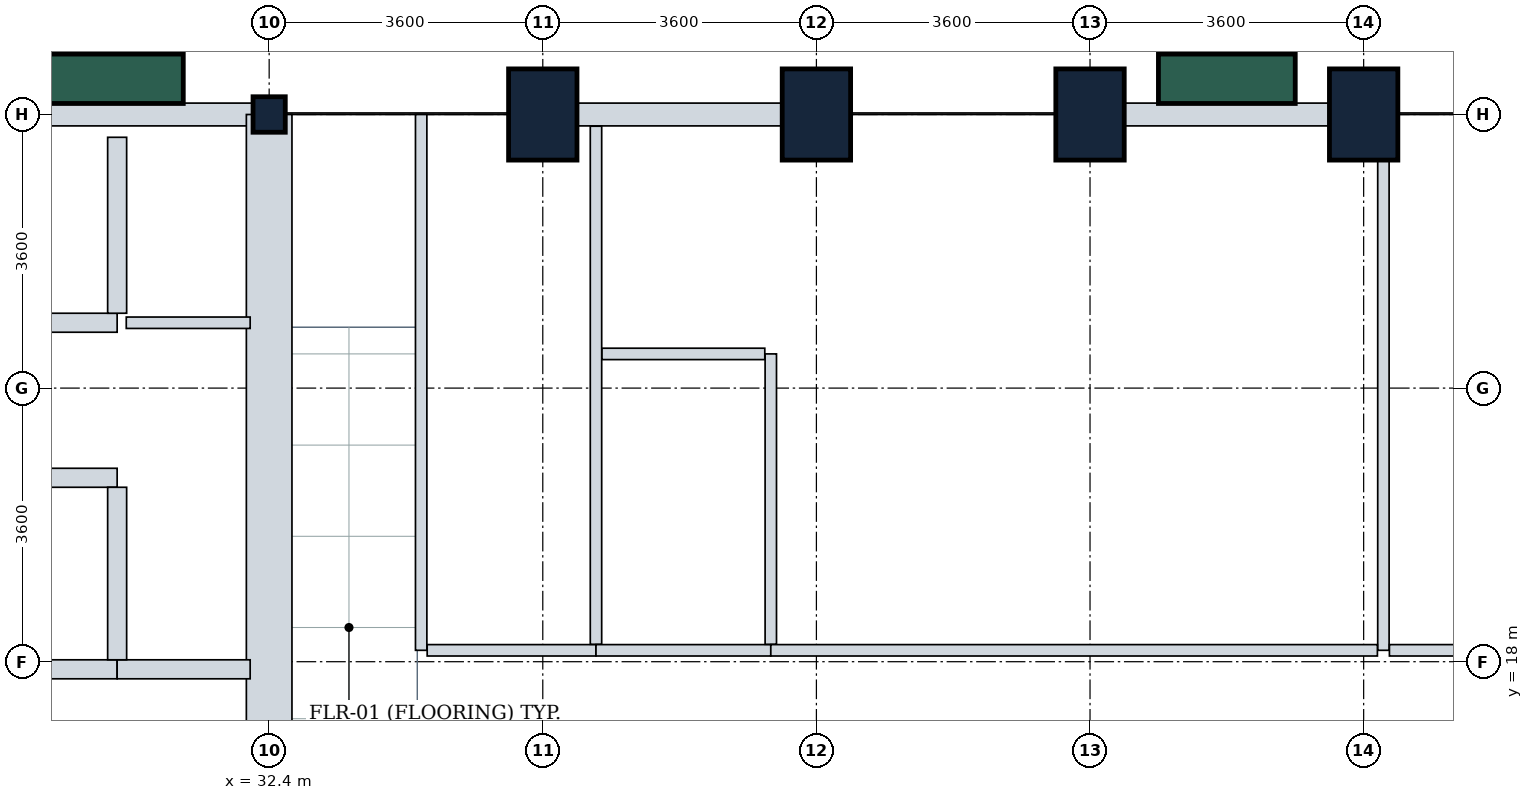
"""IFC4 building model, lengths in metres.
Left out: names, types, materials, properties, quantities, classifications, styles, units other than length and angle.
Written with IfcOpenShell. Run it as: python <this file> out.ifc"""

import sys

from ifc_helpers import new_model, si_unit, direction, frame, frame_2d, origin, origin_2d, place, context, subcontext, project, spatial, rectangle, i_section, extrude, element, fill, save


model = new_model("IFC4")
c1 = context("Model", 3, precision=1e-05, world=origin(), true_north=direction((0.0, 1.0)))
c2 = subcontext(c1, "Body", "Model", "MODEL_VIEW")
j1 = project(units=[si_unit("LENGTHUNIT", "METRE"), si_unit("PLANEANGLEUNIT", "RADIAN")], contexts=[c1])
p1 = place(None, origin())
s1 = spatial("IfcSite", under=j1, at=p1, CompositionType="ELEMENT")
p2 = place(p1, origin())
s2 = spatial("IfcBuilding", under=s1, at=p2, CompositionType="ELEMENT")
p3 = place(p2, frame((0.0, 0.0, 24.0)))
s3 = spatial("IfcBuildingStorey", under=s2, at=p3, CompositionType="ELEMENT", Elevation=24.0)
p4 = place(p3, frame((32.4, 25.2, 0.0), z_axis=(0.0, 0.0, 1.0), x_axis=(1.0, 0.0, 0.0)))
e1 = element("IfcColumn", 1, at=p4, inside=s3, PredefinedType="COLUMN", context=c2, shape_type="SweptSolid", body=[
    extrude(i_section(OverallWidth=0.424, OverallDepth=0.467, WebThickness=0.033, FlangeThickness=0.053, FilletRadius=0.015, at=origin_2d()), origin(), (0.0, 0.0, 1.0), 3.9),
])
for number, where, z_axis, x_axis in (
    (2, (36.0, 25.2, 0.0), (0.0, 0.0, 1.0), (1.0, 0.0, 0.0)),
    (3, (39.6, 25.2, 0.0), (0.0, 0.0, 1.0), (1.0, 0.0, 0.0)),
    (4, (43.2, 25.2, 0.0), (0.0, 0.0, 1.0), (1.0, 0.0, 0.0)),
    (5, (46.8, 25.2, 0.0), (0.0, 0.0, 1.0), (1.0, 0.0, 0.0)),
):
    element("IfcColumn", number, at=place(p3, frame(where, z_axis=z_axis, x_axis=x_axis)), inside=s3, PredefinedType="COLUMN", context=c2, shape_type="SweptSolid", body=[
        extrude(rectangle(XDim=0.9, YDim=1.2, at=origin_2d()), origin(), (0.0, 0.0, 1.0), 3.9),
    ])
p5 = place(p3, frame((43.2, 25.2, 0.0), z_axis=(0.0, 0.0, 1.0), x_axis=(1.0, 0.0, 0.0)))
e6 = element("IfcWall", 6, at=p5, inside=s3, PredefinedType="STANDARD", context=c2, shape_type="SweptSolid", body=[
    extrude(rectangle(XDim=3.6, YDim=0.3, at=frame_2d((1.8, 0.0))), origin(), (0.0, 0.0, 1.0), 2.93),
])
p6 = place(p5, frame((0.9, 0.0, 0.85)))
e7 = element("IfcOpeningElement", 7, at=p6, cuts=e6, PredefinedType="OPENING", context=c2, shape_type="SweptSolid", body=[
    extrude(rectangle(XDim=1.8, YDim=1.35, at=frame_2d((0.9, 0.675))), frame((0.0, 0.16, 0.0), z_axis=(0.0, -1.0, 0.0), x_axis=(1.0, 0.0, 0.0)), (0.0, 0.0, 1.0), 0.32),
])
p7 = place(p3, frame((36.0, 25.2, 0.0), z_axis=(0.0, 0.0, 1.0), x_axis=(1.0, 0.0, 0.0)))
e8 = element("IfcWall", 8, at=p7, inside=s3, PredefinedType="STANDARD", context=c2, shape_type="SweptSolid", body=[
    extrude(rectangle(XDim=3.6, YDim=0.3, at=frame_2d((1.8, 0.0))), origin(), (0.0, 0.0, 1.0), 2.93),
])
p8 = place(p3, frame((28.8, 25.2, 0.0), z_axis=(0.0, 0.0, 1.0), x_axis=(1.0, 0.0, 0.0)))
e9 = element("IfcWall", 9, at=p8, inside=s3, PredefinedType="STANDARD", context=c2, shape_type="SweptSolid", body=[
    extrude(rectangle(XDim=3.6, YDim=0.3, at=frame_2d((1.8, 0.0))), origin(), (0.0, 0.0, 1.0), 3.635),
])
p9 = place(p8, frame((0.67, 0.0, 0.85)))
e10 = element("IfcOpeningElement", 10, at=p9, cuts=e9, PredefinedType="OPENING", context=c2, shape_type="SweptSolid", body=[
    extrude(rectangle(XDim=1.8, YDim=1.35, at=frame_2d((0.9, 0.675))), frame((0.0, 0.16, 0.0), z_axis=(0.0, -1.0, 0.0), x_axis=(1.0, 0.0, 0.0)), (0.0, 0.0, 1.0), 0.32),
])
p10 = place(p3, frame((32.4, 10.8, 0.0), z_axis=(0.0, 0.0, 1.0), x_axis=(0.0, 1.0, 0.0)))
e11 = element("IfcWall", 11, at=p10, inside=s3, PredefinedType="SHEAR", context=c2, shape_type="SweptSolid", body=[
    extrude(rectangle(XDim=14.4, YDim=0.6, at=frame_2d((7.2, 0.0))), origin(), (0.0, 0.0, 1.0), 3.65),
])
p11 = place(p10, frame((4.35, 0.0, 0.0)))
e12 = element("IfcOpeningElement", 12, at=p11, cuts=e11, PredefinedType="OPENING", context=c2, shape_type="SweptSolid", body=[
    extrude(rectangle(XDim=1.2, YDim=2.1, at=frame_2d((0.6, 1.05))), frame((0.0, 0.31, 0.0), z_axis=(0.0, -1.0, 0.0), x_axis=(1.0, 0.0, 0.0)), (0.0, 0.0, 1.0), 0.62),
])
p12 = place(p10, frame((10.0, 0.0, 0.0)))
e13 = element("IfcOpeningElement", 13, at=p12, cuts=e11, PredefinedType="OPENING", context=c2, shape_type="SweptSolid", body=[
    extrude(rectangle(XDim=1.2, YDim=2.1, at=frame_2d((0.6, 1.05))), frame((0.0, 0.31, 0.0), z_axis=(0.0, -1.0, 0.0), x_axis=(1.0, 0.0, 0.0)), (0.0, 0.0, 1.0), 0.62),
])
p13 = place(p3, frame((21.88, 17.9, 0.0), z_axis=(0.0, 0.0, 1.0), x_axis=(1.0, 0.0, 0.0)))
e14 = element("IfcWall", 14, at=p13, inside=s3, PredefinedType="PARTITIONING", context=c2, shape_type="SweptSolid", body=[
    extrude(rectangle(XDim=8.52, YDim=0.25, at=frame_2d((4.26, 0.0))), origin(), (0.0, 0.0, 1.0), 3.635),
])
p14 = place(p3, frame((30.4, 17.9, 0.0), z_axis=(0.0, 0.0, 1.0), x_axis=(1.0, 0.0, 0.0)))
e15 = element("IfcWall", 15, at=p14, inside=s3, PredefinedType="PARTITIONING", context=c2, shape_type="SweptSolid", body=[
    extrude(rectangle(XDim=1.75, YDim=0.25, at=frame_2d((0.875, 0.0))), origin(), (0.0, 0.0, 1.0), 3.635),
])
p15 = place(p14, frame((0.32, 0.0, 0.0)))
e16 = element("IfcOpeningElement", 16, at=p15, cuts=e15, PredefinedType="OPENING", context=c2, shape_type="SweptSolid", body=[
    extrude(rectangle(XDim=1.1, YDim=2.1, at=frame_2d((0.55, 1.05))), frame((0.0, 0.135, 0.0), z_axis=(0.0, -1.0, 0.0), x_axis=(1.0, 0.0, 0.0)), (0.0, 0.0, 1.0), 0.27),
])
p16 = place(p3, frame((23.18, 20.42, 0.0), z_axis=(0.0, 0.0, 1.0), x_axis=(1.0, 0.0, 0.0)))
e17 = element("IfcWall", 17, at=p16, inside=s3, PredefinedType="PARTITIONING", context=c2, shape_type="SweptSolid", body=[
    extrude(rectangle(XDim=7.22, YDim=0.25, at=frame_2d((3.61, 0.0))), origin(), (0.0, 0.0, 1.0), 3.635),
])
p17 = place(p3, frame((30.4, 18.025, 0.0), z_axis=(0.0, 0.0, 1.0), x_axis=(0.0, 1.0, 0.0)))
e18 = element("IfcWall", 18, at=p17, inside=s3, PredefinedType="PARTITIONING", context=c2, shape_type="SweptSolid", body=[
    extrude(rectangle(XDim=2.27, YDim=0.25, at=frame_2d((1.135, 0.0))), origin(), (0.0, 0.0, 1.0), 3.635),
])
p18 = place(p3, frame((23.18, 22.46, 0.0), z_axis=(0.0, 0.0, 1.0), x_axis=(1.0, 0.0, 0.0)))
e19 = element("IfcWall", 19, at=p18, inside=s3, PredefinedType="PARTITIONING", context=c2, shape_type="SweptSolid", body=[
    extrude(rectangle(XDim=7.22, YDim=0.25, at=frame_2d((3.61, 0.0))), origin(), (0.0, 0.0, 1.0), 3.635),
])
p19 = place(p3, frame((30.4, 22.585, 0.0), z_axis=(0.0, 0.0, 1.0), x_axis=(0.0, 1.0, 0.0)))
e20 = element("IfcWall", 20, at=p19, inside=s3, PredefinedType="PARTITIONING", context=c2, shape_type="SweptSolid", body=[
    extrude(rectangle(XDim=2.315, YDim=0.25, at=frame_2d((1.157, 0.0))), origin(), (0.0, 0.0, 1.0), 3.635),
])
p20 = place(p3, frame((30.52, 22.46, 0.0), z_axis=(0.0, 0.0, 1.0), x_axis=(1.0, 0.0, 0.0)))
e21 = element("IfcWall", 21, at=p20, inside=s3, PredefinedType="PARTITIONING", context=c2, shape_type="SweptSolid", body=[
    extrude(rectangle(XDim=1.63, YDim=0.15, at=frame_2d((0.815, 0.0))), origin(), (0.0, 0.0, 1.0), 3.635),
])
p21 = place(p20, frame((0.38, 0.0, 0.0)))
e22 = element("IfcOpeningElement", 22, at=p21, cuts=e21, PredefinedType="OPENING", context=c2, shape_type="SweptSolid", body=[
    extrude(rectangle(XDim=0.85, YDim=2.1, at=frame_2d((0.425, 1.05))), frame((0.0, 0.085, 0.0), z_axis=(0.0, -1.0, 0.0), x_axis=(1.0, 0.0, 0.0)), (0.0, 0.0, 1.0), 0.17),
])
p22 = place(p3, frame((34.4, 18.15, 0.0), z_axis=(0.0, 0.0, 1.0), x_axis=(0.0, 1.0, 0.0)))
e23 = element("IfcWall", 23, at=p22, inside=s3, PredefinedType="PARTITIONING", context=c2, shape_type="SweptSolid", body=[
    extrude(rectangle(XDim=7.05, YDim=0.15, at=frame_2d((3.525, 0.0))), origin(), (0.0, 0.0, 1.0), 2.93),
])
p23 = place(p3, frame((34.479, 18.15, 0.0), z_axis=(0.0, 0.0, 1.0), x_axis=(1.0, 0.0, 0.0)))
e24 = element("IfcWall", 24, at=p23, inside=s3, PredefinedType="PARTITIONING", context=c2, shape_type="SweptSolid", body=[
    extrude(rectangle(XDim=2.221, YDim=0.15, at=frame_2d((1.11, 0.0))), origin(), (0.0, 0.0, 1.0), 3.08),
])
p24 = place(p23, frame((0.618, 0.0, 0.0)))
e25 = element("IfcOpeningElement", 25, at=p24, cuts=e24, PredefinedType="OPENING", context=c2, shape_type="SweptSolid", body=[
    extrude(rectangle(XDim=0.85, YDim=2.1, at=frame_2d((0.425, 1.05))), frame((0.0, 0.085, 0.0), z_axis=(0.0, -1.0, 0.0), x_axis=(1.0, 0.0, 0.0)), (0.0, 0.0, 1.0), 0.17),
])
p25 = place(p3, frame((36.7, 18.229, 0.0), z_axis=(0.0, 0.0, 1.0), x_axis=(0.0, 1.0, 0.0)))
e26 = element("IfcWall", 26, at=p25, inside=s3, PredefinedType="PARTITIONING", context=c2, shape_type="SweptSolid", body=[
    extrude(rectangle(XDim=6.817, YDim=0.15, at=frame_2d((3.408, 0.0))), origin(), (0.0, 0.0, 1.0), 2.93),
])
p26 = place(p3, frame((36.7, 18.15, 0.0), z_axis=(0.0, 0.0, 1.0), x_axis=(1.0, 0.0, 0.0)))
e27 = element("IfcWall", 27, at=p26, inside=s3, PredefinedType="PARTITIONING", context=c2, shape_type="SweptSolid", body=[
    extrude(rectangle(XDim=2.3, YDim=0.15, at=frame_2d((1.15, 0.0))), origin(), (0.0, 0.0, 1.0), 3.08),
])
p27 = place(p26, frame((0.697, 0.0, 0.0)))
e28 = element("IfcOpeningElement", 28, at=p27, cuts=e27, PredefinedType="OPENING", context=c2, shape_type="SweptSolid", body=[
    extrude(rectangle(XDim=0.85, YDim=2.1, at=frame_2d((0.425, 1.05))), frame((0.0, 0.085, 0.0), z_axis=(0.0, -1.0, 0.0), x_axis=(1.0, 0.0, 0.0)), (0.0, 0.0, 1.0), 0.17),
])
p28 = place(p3, frame((39.0, 18.229, 0.0), z_axis=(0.0, 0.0, 1.0), x_axis=(0.0, 1.0, 0.0)))
e29 = element("IfcWall", 29, at=p28, inside=s3, PredefinedType="PARTITIONING", context=c2, shape_type="SweptSolid", body=[
    extrude(rectangle(XDim=3.821, YDim=0.15, at=frame_2d((1.911, 0.0))), origin(), (0.0, 0.0, 1.0), 3.03),
])
p29 = place(p3, frame((36.779, 22.05, 0.0), z_axis=(0.0, 0.0, 1.0), x_axis=(1.0, 0.0, 0.0)))
e30 = element("IfcWall", 30, at=p29, inside=s3, PredefinedType="PARTITIONING", context=c2, shape_type="SweptSolid", body=[
    extrude(rectangle(XDim=2.142, YDim=0.15, at=frame_2d((1.071, 0.0))), origin(), (0.0, 0.0, 1.0), 3.635),
])
p30 = place(p3, frame((47.06, 18.15, 0.0), z_axis=(0.0, 0.0, 1.0), x_axis=(0.0, 1.0, 0.0)))
e31 = element("IfcWall", 31, at=p30, inside=s3, PredefinedType="PARTITIONING", context=c2, shape_type="SweptSolid", body=[
    extrude(rectangle(XDim=7.05, YDim=0.15, at=frame_2d((3.525, 0.0))), origin(), (0.0, 0.0, 1.0), 2.93),
])
p31 = place(p3, frame((39.0, 18.15, 0.0), z_axis=(0.0, 0.0, 1.0), x_axis=(1.0, 0.0, 0.0)))
e32 = element("IfcWall", 32, at=p31, inside=s3, PredefinedType="PARTITIONING", context=c2, shape_type="SweptSolid", body=[
    extrude(rectangle(XDim=7.981, YDim=0.15, at=frame_2d((3.99, 0.0))), origin(), (0.0, 0.0, 1.0), 3.03),
])
p32 = place(p31, frame((3.53, 0.0, 0.0)))
e33 = element("IfcOpeningElement", 33, at=p32, cuts=e32, PredefinedType="OPENING", context=c2, shape_type="SweptSolid", body=[
    extrude(rectangle(XDim=1.0, YDim=2.1, at=frame_2d((0.5, 1.05))), frame((0.0, 0.085, 0.0), z_axis=(0.0, -1.0, 0.0), x_axis=(1.0, 0.0, 0.0)), (0.0, 0.0, 1.0), 0.17),
])
p33 = place(p3, frame((47.139, 18.15, 0.0), z_axis=(0.0, 0.0, 1.0), x_axis=(1.0, 0.0, 0.0)))
e34 = element("IfcWall", 34, at=p33, inside=s3, PredefinedType="PARTITIONING", context=c2, shape_type="SweptSolid", body=[
    extrude(rectangle(XDim=8.661, YDim=0.15, at=frame_2d((4.331, 0.0))), origin(), (0.0, 0.0, 1.0), 3.04),
])
p34 = place(p33, frame((3.791, 0.0, 0.0)))
e35 = element("IfcOpeningElement", 35, at=p34, cuts=e34, PredefinedType="OPENING", context=c2, shape_type="SweptSolid", body=[
    extrude(rectangle(XDim=1.0, YDim=2.1, at=frame_2d((0.5, 1.05))), frame((0.0, 0.085, 0.0), z_axis=(0.0, -1.0, 0.0), x_axis=(1.0, 0.0, 0.0)), (0.0, 0.0, 1.0), 0.17),
])
p35 = place(p6, origin())
e36 = element("IfcWindow", 36, at=p35, inside=s3, PartitioningType="SINGLE_PANEL", PredefinedType="WINDOW", context=c2, shape_type="SweptSolid", body=[
    extrude(rectangle(XDim=1.8, YDim=1.35, at=frame_2d((0.9, 0.675))), frame((0.0, 0.03, 0.0), z_axis=(0.0, -1.0, 0.0), x_axis=(1.0, 0.0, 0.0)), (0.0, 0.0, 1.0), 0.06),
])
fill(e7, e36)
p36 = place(p9, origin())
e37 = element("IfcWindow", 37, at=p36, inside=s3, PartitioningType="SINGLE_PANEL", PredefinedType="WINDOW", context=c2, shape_type="SweptSolid", body=[
    extrude(rectangle(XDim=1.8, YDim=1.35, at=frame_2d((0.9, 0.675))), frame((0.0, 0.03, 0.0), z_axis=(0.0, -1.0, 0.0), x_axis=(1.0, 0.0, 0.0)), (0.0, 0.0, 1.0), 0.06),
])
fill(e10, e37)
p37 = place(p15, origin())
e38 = element("IfcDoor", 38, at=p37, inside=s3, OperationType="SINGLE_SWING_LEFT", PredefinedType="DOOR", context=c2, shape_type="SweptSolid", body=[
    extrude(rectangle(XDim=1.1, YDim=2.1, at=frame_2d((0.55, 1.05))), frame((0.0, 0.025, 0.0), z_axis=(0.0, -1.0, 0.0), x_axis=(1.0, 0.0, 0.0)), (0.0, 0.0, 1.0), 0.05),
])
fill(e16, e38)
p38 = place(p12, origin())
e39 = element("IfcDoor", 39, at=p38, inside=s3, OperationType="SINGLE_SWING_RIGHT", PredefinedType="DOOR", context=c2, shape_type="SweptSolid", body=[
    extrude(rectangle(XDim=1.2, YDim=2.1, at=frame_2d((0.6, 1.05))), frame((0.0, 0.025, 0.0), z_axis=(0.0, -1.0, 0.0), x_axis=(1.0, 0.0, 0.0)), (0.0, 0.0, 1.0), 0.05),
])
fill(e13, e39)
p39 = place(p21, origin())
e40 = element("IfcDoor", 40, at=p39, inside=s3, OperationType="SINGLE_SWING_RIGHT", PredefinedType="DOOR", context=c2, shape_type="SweptSolid", body=[
    extrude(rectangle(XDim=0.85, YDim=2.1, at=frame_2d((0.425, 1.05))), frame((0.0, 0.025, 0.0), z_axis=(0.0, -1.0, 0.0), x_axis=(1.0, 0.0, 0.0)), (0.0, 0.0, 1.0), 0.05),
])
fill(e22, e40)
p40 = place(p24, origin())
e41 = element("IfcDoor", 41, at=p40, inside=s3, OperationType="SINGLE_SWING_LEFT", PredefinedType="DOOR", context=c2, shape_type="SweptSolid", body=[
    extrude(rectangle(XDim=0.85, YDim=2.1, at=frame_2d((0.425, 1.05))), frame((0.0, 0.025, 0.0), z_axis=(0.0, -1.0, 0.0), x_axis=(1.0, 0.0, 0.0)), (0.0, 0.0, 1.0), 0.05),
])
fill(e25, e41)
p41 = place(p27, origin())
e42 = element("IfcDoor", 42, at=p41, inside=s3, OperationType="SINGLE_SWING_RIGHT", PredefinedType="DOOR", context=c2, shape_type="SweptSolid", body=[
    extrude(rectangle(XDim=0.85, YDim=2.1, at=frame_2d((0.425, 1.05))), frame((0.0, 0.025, 0.0), z_axis=(0.0, -1.0, 0.0), x_axis=(1.0, 0.0, 0.0)), (0.0, 0.0, 1.0), 0.05),
])
fill(e28, e42)
p42 = place(p32, origin())
e43 = element("IfcDoor", 43, at=p42, inside=s3, OperationType="SINGLE_SWING_RIGHT", PredefinedType="DOOR", context=c2, shape_type="SweptSolid", body=[
    extrude(rectangle(XDim=1.0, YDim=2.1, at=frame_2d((0.5, 1.05))), frame((0.0, 0.025, 0.0), z_axis=(0.0, -1.0, 0.0), x_axis=(1.0, 0.0, 0.0)), (0.0, 0.0, 1.0), 0.05),
])
fill(e33, e43)
save(model, sys.argv[1])
